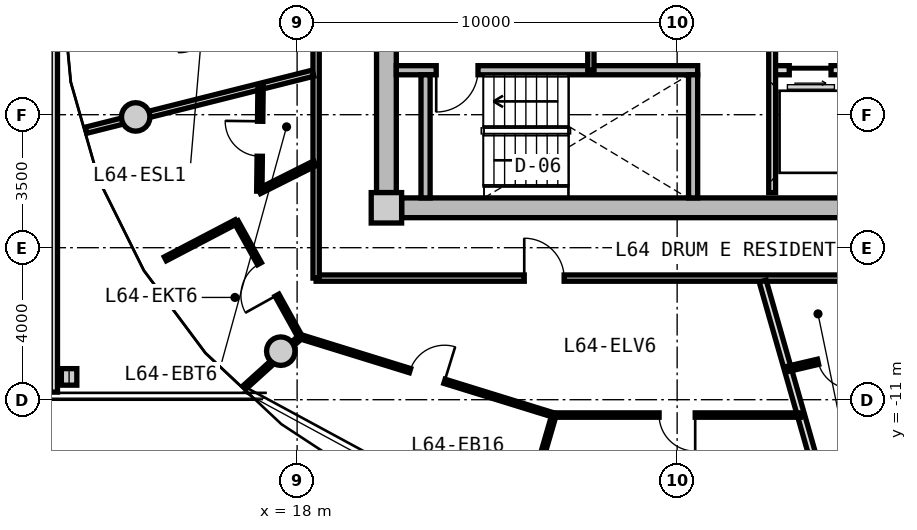
"""IFC4 building model, lengths in metres.
Left out: names, types, materials, properties, quantities, classifications, styles, units other than length and angle.
Written with IfcOpenShell. Run it as: python <this file> out.ifc"""

import sys

from ifc_helpers import new_model, si_unit, direction, frame, frame_2d, origin, origin_2d, place, context, subcontext, project, spatial, rectangle, circle, i_section, extrude, source, transform, mapped, element, fill, save


model = new_model("IFC4")
c1 = context("Model", 3, precision=1e-05, world=origin(), true_north=direction((0.0, 1.0)))
c2 = subcontext(c1, "Body", "Model", "MODEL_VIEW")
j1 = project(units=[si_unit("LENGTHUNIT", "METRE"), si_unit("PLANEANGLEUNIT", "RADIAN")], contexts=[c1])
p1 = place(None, origin())
s1 = spatial("IfcSite", under=j1, at=p1, CompositionType="ELEMENT")
p2 = place(p1, origin())
s2 = spatial("IfcBuilding", under=s1, at=p2, CompositionType="ELEMENT")
p3 = place(p2, frame((0.0, 0.0, 207.8)))
s3 = spatial("IfcBuildingStorey", under=s2, at=p3, CompositionType="ELEMENT", Elevation=207.8)
m1 = source(origin(), c2, "Body", "SweptSolid", [
    extrude(rectangle(XDim=0.8, YDim=0.8, at=origin_2d()), origin(), (0.0, 0.0, 1.0), 3.05),
])
p4 = place(p3, frame((20.35, -5.95, 0.0), z_axis=(0.0, 0.0, 1.0), x_axis=(1.0, 0.0, 0.0)))
e1 = element("IfcColumn", 1, at=p4, inside=s3, PredefinedType="COLUMN", context=c2, shape_type="MappedRepresentation", body=[
    mapped(m1, transform((0.0, 0.0, 0.0), x_axis=(1.0, 0.0, 0.0), y_axis=(0.0, 1.0, 0.0), z_axis=(0.0, 0.0, 1.0), scale=1.0)),
])
m2 = source(origin(), c2, "Body", "SweptSolid", [
    extrude(rectangle(XDim=14.5, YDim=0.52, at=frame_2d((7.25, 0.0))), origin(), (0.0, 0.0, 1.0), 2.76),
])
p5 = place(p3, frame((35.25, -5.95, 0.0), z_axis=(0.0, 0.0, 1.0), x_axis=(-1.0, 0.0, 0.0)))
e2 = element("IfcWall", 2, at=p5, inside=s3, PredefinedType="SHEAR", context=c2, shape_type="MappedRepresentation", body=[
    mapped(m2, transform((0.0, 0.0, 0.0), x_axis=(1.0, 0.0, 0.0), y_axis=(0.0, 1.0, 0.0), z_axis=(0.0, 0.0, 1.0), scale=1.0)),
])
m3 = source(origin(), c2, "Body", "SweptSolid", [
    extrude(rectangle(XDim=11.1, YDim=0.52, at=frame_2d((5.55, 0.0))), origin(), (0.0, 0.0, 1.0), 2.76),
])
p6 = place(p3, frame((20.35, -5.55, 0.0), z_axis=(0.0, 0.0, 1.0), x_axis=(0.0, 1.0, 0.0)))
e3 = element("IfcWall", 3, at=p6, inside=s3, PredefinedType="SHEAR", context=c2, shape_type="MappedRepresentation", body=[
    mapped(m3, transform((0.0, 0.0, 0.0), x_axis=(1.0, 0.0, 0.0), y_axis=(0.0, 1.0, 0.0), z_axis=(0.0, 0.0, 1.0), scale=1.0)),
])
p7 = place(p6, frame((3.8, 0.0, 0.0)))
e4 = element("IfcOpeningElement", 4, at=p7, cuts=e3, PredefinedType="OPENING", context=c2, shape_type="SweptSolid", body=[
    extrude(rectangle(XDim=1.2, YDim=2.15, at=frame_2d((0.6, 1.075))), frame((0.0, 0.27, 0.0), z_axis=(0.0, -1.0, 0.0), x_axis=(1.0, 0.0, 0.0)), (0.0, 0.0, 1.0), 0.54),
])
m4 = source(origin(), c2, "Body", "SweptSolid", [
    extrude(circle(Radius=0.375, at=origin_2d()), origin(), (0.0, 0.0, 1.0), 3.05),
])
for number, where, z_axis, x_axis in (
    (5, (13.753, -3.559, 0.0), (0.0, 0.0, 1.0), (1.0, 0.0, 0.0)),
    (6, (17.57, -9.723, 0.0), (0.0, 0.0, 1.0), (1.0, 0.0, 0.0)),
):
    element("IfcColumn", number, at=place(p3, frame(where, z_axis=z_axis, x_axis=x_axis)), inside=s3, PredefinedType="COLUMN", context=c2, shape_type="MappedRepresentation", body=[
        mapped(m4, transform((0.0, 0.0, 0.0), x_axis=(1.0, 0.0, 0.0), y_axis=(0.0, 1.0, 0.0), z_axis=(0.0, 0.0, 1.0), scale=1.0)),
    ])
m5 = source(origin(), c2, "Body", "SweptSolid", [
    extrude(i_section(OverallWidth=0.407, OverallDepth=0.435, WebThickness=0.024, FlangeThickness=0.039, FilletRadius=0.015, at=origin_2d()), origin(), (0.0, 0.0, 1.0), 3.05),
])
p8 = place(p3, frame((12.0, -10.4, 0.0), z_axis=(0.0, 0.0, 1.0), x_axis=(1.0, 0.0, 0.0)))
e7 = element("IfcColumn", 7, at=p8, inside=s3, PredefinedType="COLUMN", context=c2, shape_type="MappedRepresentation", body=[
    mapped(m5, transform((0.0, 0.0, 0.0), x_axis=(1.0, 0.0, 0.0), y_axis=(0.0, 1.0, 0.0), z_axis=(0.0, 0.0, 1.0), scale=1.0)),
])
m6 = source(origin(), c2, "Body", "SweptSolid", [
    extrude(rectangle(XDim=7.93, YDim=0.24, at=frame_2d((3.965, 0.0))), origin(), (0.0, 0.0, 1.0), 2.76),
])
p9 = place(p3, frame((20.61, -2.33, 0.0), z_axis=(0.0, 0.0, 1.0), x_axis=(1.0, 0.0, 0.0)))
e8 = element("IfcWall", 8, at=p9, inside=s3, PredefinedType="PARTITIONING", context=c2, shape_type="MappedRepresentation", body=[
    mapped(m6, transform((0.0, 0.0, 0.0), x_axis=(1.0, 0.0, 0.0), y_axis=(0.0, 1.0, 0.0), z_axis=(0.0, 0.0, 1.0), scale=1.0)),
])
p10 = place(p9, frame((1.05, 0.0, 0.0)))
e9 = element("IfcOpeningElement", 9, at=p10, cuts=e8, PredefinedType="OPENING", context=c2, shape_type="SweptSolid", body=[
    extrude(rectangle(XDim=1.1, YDim=2.15, at=frame_2d((0.55, 1.075))), frame((0.0, 0.13, 0.0), z_axis=(0.0, -1.0, 0.0), x_axis=(1.0, 0.0, 0.0)), (0.0, 0.0, 1.0), 0.26),
])
m7 = source(origin(), c2, "Body", "SweptSolid", [
    extrude(rectangle(XDim=3.24, YDim=0.24, at=frame_2d((1.62, 0.0))), origin(), (0.0, 0.0, 1.0), 2.76),
])
for number, where, z_axis, x_axis in (
    (10, (21.38, -5.69, 0.0), (0.0, 0.0, 1.0), (0.0, 1.0, 0.0)),
    (11, (28.42, -5.69, 0.0), (0.0, 0.0, 1.0), (0.0, 1.0, 0.0)),
):
    element("IfcWall", number, at=place(p3, frame(where, z_axis=z_axis, x_axis=x_axis)), inside=s3, PredefinedType="PARTITIONING", context=c2, shape_type="MappedRepresentation", body=[
        mapped(m7, transform((0.0, 0.0, 0.0), x_axis=(1.0, 0.0, 0.0), y_axis=(0.0, 1.0, 0.0), z_axis=(0.0, 0.0, 1.0), scale=1.0)),
    ])
m8 = source(origin(), c2, "Body", "SweptSolid", [
    extrude(rectangle(XDim=2.05, YDim=0.24, at=frame_2d((1.025, 0.0))), origin(), (0.0, 0.0, 1.0), 2.745),
])
p11 = place(p3, frame((30.5, -2.33, 0.0), z_axis=(0.0, 0.0, 1.0), x_axis=(1.0, 0.0, 0.0)))
e12 = element("IfcWall", 12, at=p11, inside=s3, PredefinedType="PARTITIONING", context=c2, shape_type="MappedRepresentation", body=[
    mapped(m8, transform((0.0, 0.0, 0.0), x_axis=(1.0, 0.0, 0.0), y_axis=(0.0, 1.0, 0.0), z_axis=(0.0, 0.0, 1.0), scale=1.0)),
])
p12 = place(p11, frame((0.45, 0.0, 0.0)))
e13 = element("IfcOpeningElement", 13, at=p12, cuts=e12, PredefinedType="OPENING", context=c2, shape_type="SweptSolid", body=[
    extrude(rectangle(XDim=1.1, YDim=2.2, at=frame_2d((0.55, 1.1))), frame((0.0, 0.13, 0.0), z_axis=(0.0, -1.0, 0.0), x_axis=(1.0, 0.0, 0.0)), (0.0, 0.0, 1.0), 0.26),
])
m9 = source(origin(), c2, "Body", "SweptSolid", [
    extrude(rectangle(XDim=4.2, YDim=0.18, at=frame_2d((2.1, 0.0))), origin(), (0.0, 0.0, 1.0), 2.745),
])
p13 = place(p3, frame((30.5, -5.55, 0.0), z_axis=(0.0, 0.0, 1.0), x_axis=(0.0, 1.0, 0.0)))
e14 = element("IfcWall", 14, at=p13, inside=s3, PredefinedType="PARTITIONING", context=c2, shape_type="MappedRepresentation", body=[
    mapped(m9, transform((0.0, 0.0, 0.0), x_axis=(1.0, 0.0, 0.0), y_axis=(0.0, 1.0, 0.0), z_axis=(0.0, 0.0, 1.0), scale=1.0)),
])
m10 = source(origin(), c2, "Body", "SweptSolid", [
    extrude(rectangle(XDim=0.98, YDim=0.165, at=frame_2d((0.49, 0.0))), origin(), (0.0, 0.0, 1.0), 2.745),
])
p14 = place(p3, frame((25.73, -2.33, 0.0), z_axis=(0.0, 0.0, 1.0), x_axis=(0.0, 1.0, 0.0)))
e15 = element("IfcWall", 15, at=p14, inside=s3, PredefinedType="PARTITIONING", context=c2, shape_type="MappedRepresentation", body=[
    mapped(m10, transform((0.0, 0.0, 0.0), x_axis=(1.0, 0.0, 0.0), y_axis=(0.0, 1.0, 0.0), z_axis=(0.0, 0.0, 1.0), scale=1.0)),
])
m11 = source(origin(), c2, "Body", "SweptSolid", [
    extrude(rectangle(XDim=19.0, YDim=0.165, at=frame_2d((9.5, 0.0))), origin(), (0.0, 0.0, 1.0), 2.745),
])
p15 = place(p3, frame((37.5, -7.8, 0.0), z_axis=(0.0, 0.0, 1.0), x_axis=(-1.0, 0.0, 0.0)))
e16 = element("IfcWall", 16, at=p15, inside=s3, PredefinedType="PARTITIONING", context=c2, shape_type="MappedRepresentation", body=[
    mapped(m11, transform((0.0, 0.0, 0.0), x_axis=(1.0, 0.0, 0.0), y_axis=(0.0, 1.0, 0.0), z_axis=(0.0, 0.0, 1.0), scale=1.0)),
])
p16 = place(p15, frame((12.473, 0.0, 0.0)))
e17 = element("IfcOpeningElement", 17, at=p16, cuts=e16, PredefinedType="OPENING", context=c2, shape_type="SweptSolid", body=[
    extrude(rectangle(XDim=1.05, YDim=2.15, at=frame_2d((0.525, 1.075))), frame((0.0, 0.093, 0.0), z_axis=(0.0, -1.0, 0.0), x_axis=(1.0, 0.0, 0.0)), (0.0, 0.0, 1.0), 0.185),
])
m12 = source(origin(), c2, "Body", "SweptSolid", [
    extrude(rectangle(XDim=6.88, YDim=0.165, at=frame_2d((3.44, 0.0))), origin(), (0.0, 0.0, 1.0), 2.745),
])
p17 = place(p3, frame((18.5, -7.8, 0.0), z_axis=(0.0, 0.0, 1.0), x_axis=(0.0, 1.0, 0.0)))
e18 = element("IfcWall", 18, at=p17, inside=s3, PredefinedType="PARTITIONING", context=c2, shape_type="MappedRepresentation", body=[
    mapped(m12, transform((0.0, 0.0, 0.0), x_axis=(1.0, 0.0, 0.0), y_axis=(0.0, 1.0, 0.0), z_axis=(0.0, 0.0, 1.0), scale=1.0)),
])
m13 = source(origin(), c2, "Body", "SweptSolid", [
    extrude(rectangle(XDim=6.157, YDim=0.165, at=frame_2d((3.079, 0.0))), origin(), (0.0, 0.0, 1.0), 2.345),
])
p18 = place(p3, frame((18.42, -2.407, 0.0), z_axis=(0.0, 0.0, 1.0), x_axis=(-0.969840867184, -0.243738984038, 0.0)))
e19 = element("IfcWall", 19, at=p18, inside=s3, PredefinedType="PARTITIONING", context=c2, shape_type="MappedRepresentation", body=[
    mapped(m13, transform((0.0, 0.0, 0.0), x_axis=(1.0, 0.0, 0.0), y_axis=(0.0, 1.0, 0.0), z_axis=(0.0, 0.0, 1.0), scale=1.0)),
])
m14 = source(origin(), c2, "Body", "SweptSolid", [
    extrude(rectangle(XDim=6.974, YDim=0.19, at=frame_2d((3.487, 0.0))), origin(), (0.0, 0.0, 1.0), 2.345),
])
p19 = place(p3, frame((30.251, -7.88, 0.0), z_axis=(0.0, 0.0, 1.0), x_axis=(0.274707256801, -0.961527910703, 0.0)))
e20 = element("IfcWall", 20, at=p19, inside=s3, PredefinedType="PARTITIONING", context=c2, shape_type="MappedRepresentation", body=[
    mapped(m14, transform((0.0, 0.0, 0.0), x_axis=(1.0, 0.0, 0.0), y_axis=(0.0, 1.0, 0.0), z_axis=(0.0, 0.0, 1.0), scale=1.0)),
])
m15 = source(origin(), c2, "Body", "SweptSolid", [
    extrude(rectangle(XDim=6.98, YDim=0.115, at=frame_2d((3.49, 0.0))), origin(), (0.0, 0.0, 1.0), 2.745),
])
p20 = place(p3, frame((18.091, -9.344, 0.0), z_axis=(0.0, 0.0, 1.0), x_axis=(0.955342331637, -0.295501318749, 0.0)))
e21 = element("IfcWall", 21, at=p20, inside=s3, PredefinedType="PARTITIONING", context=c2, shape_type="MappedRepresentation", body=[
    mapped(m15, transform((0.0, 0.0, 0.0), x_axis=(1.0, 0.0, 0.0), y_axis=(0.0, 1.0, 0.0), z_axis=(0.0, 0.0, 1.0), scale=1.0)),
])
p21 = place(p20, frame((3.015, 0.0, 0.0)))
e22 = element("IfcOpeningElement", 22, at=p21, cuts=e21, PredefinedType="OPENING", context=c2, shape_type="SweptSolid", body=[
    extrude(rectangle(XDim=0.95, YDim=2.1, at=frame_2d((0.475, 1.05))), frame((0.0, 0.067, 0.0), z_axis=(0.0, -1.0, 0.0), x_axis=(1.0, 0.0, 0.0)), (0.0, 0.0, 1.0), 0.135),
])
m16 = source(origin(), c2, "Body", "SweptSolid", [
    extrude(rectangle(XDim=1.988, YDim=0.115, at=frame_2d((0.994, 0.0))), origin(), (0.0, 0.0, 1.0), 2.345),
])
p22 = place(p3, frame((18.091, -9.344, 0.0), z_axis=(0.0, 0.0, 1.0), x_axis=(-0.741992301729, -0.670408401033, 0.0)))
e23 = element("IfcWall", 23, at=p22, inside=s3, PredefinedType="PARTITIONING", context=c2, shape_type="MappedRepresentation", body=[
    mapped(m16, transform((0.0, 0.0, 0.0), x_axis=(1.0, 0.0, 0.0), y_axis=(0.0, 1.0, 0.0), z_axis=(0.0, 0.0, 1.0), scale=1.0)),
])
m17 = source(origin(), c2, "Body", "SweptSolid", [
    extrude(rectangle(XDim=6.481, YDim=0.115, at=frame_2d((3.24, 0.0))), origin(), (0.0, 0.0, 1.0), 2.745),
])
p23 = place(p3, frame((24.76, -11.404, 0.0), z_axis=(0.0, 0.0, 1.0), x_axis=(1.0, 0.0, 0.0)))
e24 = element("IfcWall", 24, at=p23, inside=s3, PredefinedType="PARTITIONING", context=c2, shape_type="MappedRepresentation", body=[
    mapped(m17, transform((0.0, 0.0, 0.0), x_axis=(1.0, 0.0, 0.0), y_axis=(0.0, 1.0, 0.0), z_axis=(0.0, 0.0, 1.0), scale=1.0)),
])
p24 = place(p23, frame((2.765, 0.0, 0.0)))
e25 = element("IfcOpeningElement", 25, at=p24, cuts=e24, PredefinedType="OPENING", context=c2, shape_type="SweptSolid", body=[
    extrude(rectangle(XDim=0.95, YDim=2.1, at=frame_2d((0.475, 1.05))), frame((0.0, 0.067, 0.0), z_axis=(0.0, -1.0, 0.0), x_axis=(1.0, 0.0, 0.0)), (0.0, 0.0, 1.0), 0.135),
])
m18 = source(origin(), c2, "Body", "SweptSolid", [
    extrude(rectangle(XDim=3.313, YDim=0.115, at=frame_2d((1.657, 0.0))), origin(), (0.0, 0.0, 1.0), 2.345),
])
p25 = place(p3, frame((24.76, -11.404, 0.0), z_axis=(0.0, 0.0, 1.0), x_axis=(-0.279612365916, -0.960112975033, 0.0)))
e26 = element("IfcWall", 26, at=p25, inside=s3, PredefinedType="PARTITIONING", context=c2, shape_type="MappedRepresentation", body=[
    mapped(m18, transform((0.0, 0.0, 0.0), x_axis=(1.0, 0.0, 0.0), y_axis=(0.0, 1.0, 0.0), z_axis=(0.0, 0.0, 1.0), scale=1.0)),
])
m19 = source(origin(), c2, "Body", "SweptSolid", [
    extrude(rectangle(XDim=1.638, YDim=0.14, at=frame_2d((0.819, 0.0))), origin(), (0.0, 0.0, 1.0), 2.745),
])
p26 = place(p3, frame((18.47, -4.778, 0.0), z_axis=(0.0, 0.0, 1.0), x_axis=(-0.893919977945, -0.448226586707, 0.0)))
e27 = element("IfcWall", 27, at=p26, inside=s3, PredefinedType="PARTITIONING", context=c2, shape_type="MappedRepresentation", body=[
    mapped(m19, transform((0.0, 0.0, 0.0), x_axis=(1.0, 0.0, 0.0), y_axis=(0.0, 1.0, 0.0), z_axis=(0.0, 0.0, 1.0), scale=1.0)),
])
m20 = source(origin(), c2, "Body", "SweptSolid", [
    extrude(rectangle(XDim=2.759, YDim=0.14, at=frame_2d((1.379, 0.0))), origin(), (0.0, 0.0, 1.0), 2.745),
])
p27 = place(p3, frame((17.005, -5.513, 0.0), z_axis=(0.0, 0.0, 1.0), x_axis=(0.01194710728, 0.999928630767, 0.0)))
e28 = element("IfcWall", 28, at=p27, inside=s3, PredefinedType="PARTITIONING", context=c2, shape_type="MappedRepresentation", body=[
    mapped(m20, transform((0.0, 0.0, 0.0), x_axis=(1.0, 0.0, 0.0), y_axis=(0.0, 1.0, 0.0), z_axis=(0.0, 0.0, 1.0), scale=1.0)),
])
p28 = place(p27, frame((0.919, 0.0, 0.0)))
e29 = element("IfcOpeningElement", 29, at=p28, cuts=e28, PredefinedType="OPENING", context=c2, shape_type="SweptSolid", body=[
    extrude(rectangle(XDim=0.92, YDim=2.1, at=frame_2d((0.46, 1.05))), frame((0.0, 0.08, 0.0), z_axis=(0.0, -1.0, 0.0), x_axis=(1.0, 0.0, 0.0)), (0.0, 0.0, 1.0), 0.16),
])
m21 = source(origin(), c2, "Body", "SweptSolid", [
    extrude(rectangle(XDim=2.104, YDim=0.115, at=frame_2d((1.052, 0.0))), origin(), (0.0, 0.0, 1.0), 2.745),
])
p29 = place(p3, frame((16.396, -6.317, 0.0), z_axis=(0.0, 0.0, 1.0), x_axis=(-0.886060817493, -0.463569010724, 0.0)))
e30 = element("IfcWall", 30, at=p29, inside=s3, PredefinedType="PARTITIONING", context=c2, shape_type="MappedRepresentation", body=[
    mapped(m21, transform((0.0, 0.0, 0.0), x_axis=(1.0, 0.0, 0.0), y_axis=(0.0, 1.0, 0.0), z_axis=(0.0, 0.0, 1.0), scale=1.0)),
])
m22 = source(origin(), c2, "Body", "SweptSolid", [
    extrude(rectangle(XDim=3.472, YDim=0.115, at=frame_2d((1.736, 0.0))), origin(), (0.0, 0.0, 1.0), 2.745),
])
p30 = place(p3, frame((16.396, -6.317, 0.0), z_axis=(0.0, 0.0, 1.0), x_axis=(0.485804139346, -0.874067696574, 0.0)))
e31 = element("IfcWall", 31, at=p30, inside=s3, PredefinedType="PARTITIONING", context=c2, shape_type="MappedRepresentation", body=[
    mapped(m22, transform((0.0, 0.0, 0.0), x_axis=(1.0, 0.0, 0.0), y_axis=(0.0, 1.0, 0.0), z_axis=(0.0, 0.0, 1.0), scale=1.0)),
])
p31 = place(p30, frame((1.261, 0.0, 0.0)))
e32 = element("IfcOpeningElement", 32, at=p31, cuts=e31, PredefinedType="OPENING", context=c2, shape_type="SweptSolid", body=[
    extrude(rectangle(XDim=0.95, YDim=2.1, at=frame_2d((0.475, 1.05))), frame((0.0, 0.067, 0.0), z_axis=(0.0, -1.0, 0.0), x_axis=(1.0, 0.0, 0.0)), (0.0, 0.0, 1.0), 0.135),
])
m23 = source(origin(), c2, "Body", "SweptSolid", [
    extrude(rectangle(XDim=2.586, YDim=0.14, at=frame_2d((1.293, 0.0))), origin(), (0.0, 0.0, 1.0), 2.745),
])
p32 = place(p3, frame((33.415, -9.603, 0.0), z_axis=(0.0, 0.0, 1.0), x_axis=(-0.973691298219, -0.227871138526, 0.0)))
e33 = element("IfcWall", 33, at=p32, inside=s3, PredefinedType="PARTITIONING", context=c2, shape_type="MappedRepresentation", body=[
    mapped(m23, transform((0.0, 0.0, 0.0), x_axis=(1.0, 0.0, 0.0), y_axis=(0.0, 1.0, 0.0), z_axis=(0.0, 0.0, 1.0), scale=1.0)),
])
p33 = place(p32, frame((0.833, 0.0, 0.0)))
e34 = element("IfcOpeningElement", 34, at=p33, cuts=e33, PredefinedType="OPENING", context=c2, shape_type="SweptSolid", body=[
    extrude(rectangle(XDim=0.92, YDim=2.1, at=frame_2d((0.46, 1.05))), frame((0.0, 0.08, 0.0), z_axis=(0.0, -1.0, 0.0), x_axis=(1.0, 0.0, 0.0)), (0.0, 0.0, 1.0), 0.16),
])
m24 = source(origin(), c2, "Body", "SweptSolid", [
    extrude(rectangle(XDim=9.88, YDim=0.19, at=frame_2d((4.94, 0.0))), origin(), (0.0, 0.0, 1.0), 2.745),
])
p34 = place(p3, frame((11.6, -10.8, 0.0), z_axis=(0.0, 0.0, 1.0), x_axis=(0.0, 1.0, 0.0)))
e35 = element("IfcWall", 35, at=p34, inside=s3, PredefinedType="PARTITIONING", context=c2, shape_type="MappedRepresentation", body=[
    mapped(m24, transform((0.0, 0.0, 0.0), x_axis=(1.0, 0.0, 0.0), y_axis=(0.0, 1.0, 0.0), z_axis=(0.0, 0.0, 1.0), scale=1.0)),
])
m25 = source(origin(), c2, "Body", "SweptSolid", [
    extrude(rectangle(XDim=1.1, YDim=2.15, at=frame_2d((0.55, 1.075))), frame((0.0, 0.025, 0.0), z_axis=(0.0, -1.0, 0.0), x_axis=(1.0, 0.0, 0.0)), (0.0, 0.0, 1.0), 0.05),
])
p35 = place(p10, frame((1.1, 0.0, 0.0), z_axis=(0.0, 0.0, 1.0), x_axis=(-1.0, 0.0, 0.0)))
e36 = element("IfcDoor", 36, at=p35, inside=s3, OperationType="SINGLE_SWING_RIGHT", PredefinedType="DOOR", context=c2, shape_type="MappedRepresentation", body=[
    mapped(m25, transform((0.0, 0.0, 0.0), x_axis=(1.0, 0.0, 0.0), y_axis=(0.0, 1.0, 0.0), z_axis=(0.0, 0.0, 1.0), scale=1.0)),
])
fill(e9, e36)
m26 = source(origin(), c2, "Body", "SweptSolid", [
    extrude(rectangle(XDim=1.1, YDim=2.2, at=frame_2d((0.55, 1.1))), frame((0.0, 0.025, 0.0), z_axis=(0.0, -1.0, 0.0), x_axis=(1.0, 0.0, 0.0)), (0.0, 0.0, 1.0), 0.05),
])
p36 = place(p12, frame((1.1, 0.0, 0.0), z_axis=(0.0, 0.0, 1.0), x_axis=(-1.0, 0.0, 0.0)))
e37 = element("IfcDoor", 37, at=p36, inside=s3, OperationType="SLIDING_TO_RIGHT", PredefinedType="DOOR", context=c2, shape_type="MappedRepresentation", body=[
    mapped(m26, transform((0.0, 0.0, 0.0), x_axis=(1.0, 0.0, 0.0), y_axis=(0.0, 1.0, 0.0), z_axis=(0.0, 0.0, 1.0), scale=1.0)),
])
fill(e13, e37)
m27 = source(origin(), c2, "Body", "SweptSolid", [
    extrude(rectangle(XDim=1.05, YDim=2.15, at=frame_2d((0.525, 1.075))), frame((0.0, 0.025, 0.0), z_axis=(0.0, -1.0, 0.0), x_axis=(1.0, 0.0, 0.0)), (0.0, 0.0, 1.0), 0.05),
])
p37 = place(p16, frame((1.05, 0.0, 0.0), z_axis=(0.0, 0.0, 1.0), x_axis=(-1.0, 0.0, 0.0)))
e38 = element("IfcDoor", 38, at=p37, inside=s3, OperationType="SINGLE_SWING_LEFT", PredefinedType="DOOR", context=c2, shape_type="MappedRepresentation", body=[
    mapped(m27, transform((0.0, 0.0, 0.0), x_axis=(1.0, 0.0, 0.0), y_axis=(0.0, 1.0, 0.0), z_axis=(0.0, 0.0, 1.0), scale=1.0)),
])
fill(e17, e38)
m28 = source(origin(), c2, "Body", "SweptSolid", [
    extrude(rectangle(XDim=0.92, YDim=2.1, at=frame_2d((0.46, 1.05))), frame((0.0, 0.025, 0.0), z_axis=(0.0, -1.0, 0.0), x_axis=(1.0, 0.0, 0.0)), (0.0, 0.0, 1.0), 0.05),
])
p38 = place(p28, origin())
e39 = element("IfcDoor", 39, at=p38, inside=s3, OperationType="SINGLE_SWING_RIGHT", PredefinedType="DOOR", context=c2, shape_type="MappedRepresentation", body=[
    mapped(m28, transform((0.0, 0.0, 0.0), x_axis=(1.0, 0.0, 0.0), y_axis=(0.0, 1.0, 0.0), z_axis=(0.0, 0.0, 1.0), scale=1.0)),
])
fill(e29, e39)
m29 = source(origin(), c2, "Body", "SweptSolid", [
    extrude(rectangle(XDim=0.95, YDim=2.1, at=frame_2d((0.475, 1.05))), frame((0.0, 0.025, 0.0), z_axis=(0.0, -1.0, 0.0), x_axis=(1.0, 0.0, 0.0)), (0.0, 0.0, 1.0), 0.05),
])
p39 = place(p31, frame((0.95, 0.0, 0.0), z_axis=(0.0, 0.0, 1.0), x_axis=(-1.0, 0.0, 0.0)))
e40 = element("IfcDoor", 40, at=p39, inside=s3, OperationType="SINGLE_SWING_LEFT", PredefinedType="DOOR", context=c2, shape_type="MappedRepresentation", body=[
    mapped(m29, transform((0.0, 0.0, 0.0), x_axis=(1.0, 0.0, 0.0), y_axis=(0.0, 1.0, 0.0), z_axis=(0.0, 0.0, 1.0), scale=1.0)),
])
fill(e32, e40)
p40 = place(p21, origin())
e41 = element("IfcDoor", 41, at=p40, inside=s3, OperationType="SINGLE_SWING_RIGHT", PredefinedType="DOOR", context=c2, shape_type="MappedRepresentation", body=[
    mapped(m29, transform((0.0, 0.0, 0.0), x_axis=(1.0, 0.0, 0.0), y_axis=(0.0, 1.0, 0.0), z_axis=(0.0, 0.0, 1.0), scale=1.0)),
])
fill(e22, e41)
p41 = place(p24, frame((0.95, 0.0, 0.0), z_axis=(0.0, 0.0, 1.0), x_axis=(-1.0, 0.0, 0.0)))
e42 = element("IfcDoor", 42, at=p41, inside=s3, OperationType="SINGLE_SWING_LEFT", PredefinedType="DOOR", context=c2, shape_type="MappedRepresentation", body=[
    mapped(m29, transform((0.0, 0.0, 0.0), x_axis=(1.0, 0.0, 0.0), y_axis=(0.0, 1.0, 0.0), z_axis=(0.0, 0.0, 1.0), scale=1.0)),
])
fill(e25, e42)
p42 = place(p33, origin())
e43 = element("IfcDoor", 43, at=p42, inside=s3, OperationType="SINGLE_SWING_LEFT", PredefinedType="DOOR", context=c2, shape_type="MappedRepresentation", body=[
    mapped(m28, transform((0.0, 0.0, 0.0), x_axis=(1.0, 0.0, 0.0), y_axis=(0.0, 1.0, 0.0), z_axis=(0.0, 0.0, 1.0), scale=1.0)),
])
fill(e34, e43)
save(model, sys.argv[1])
